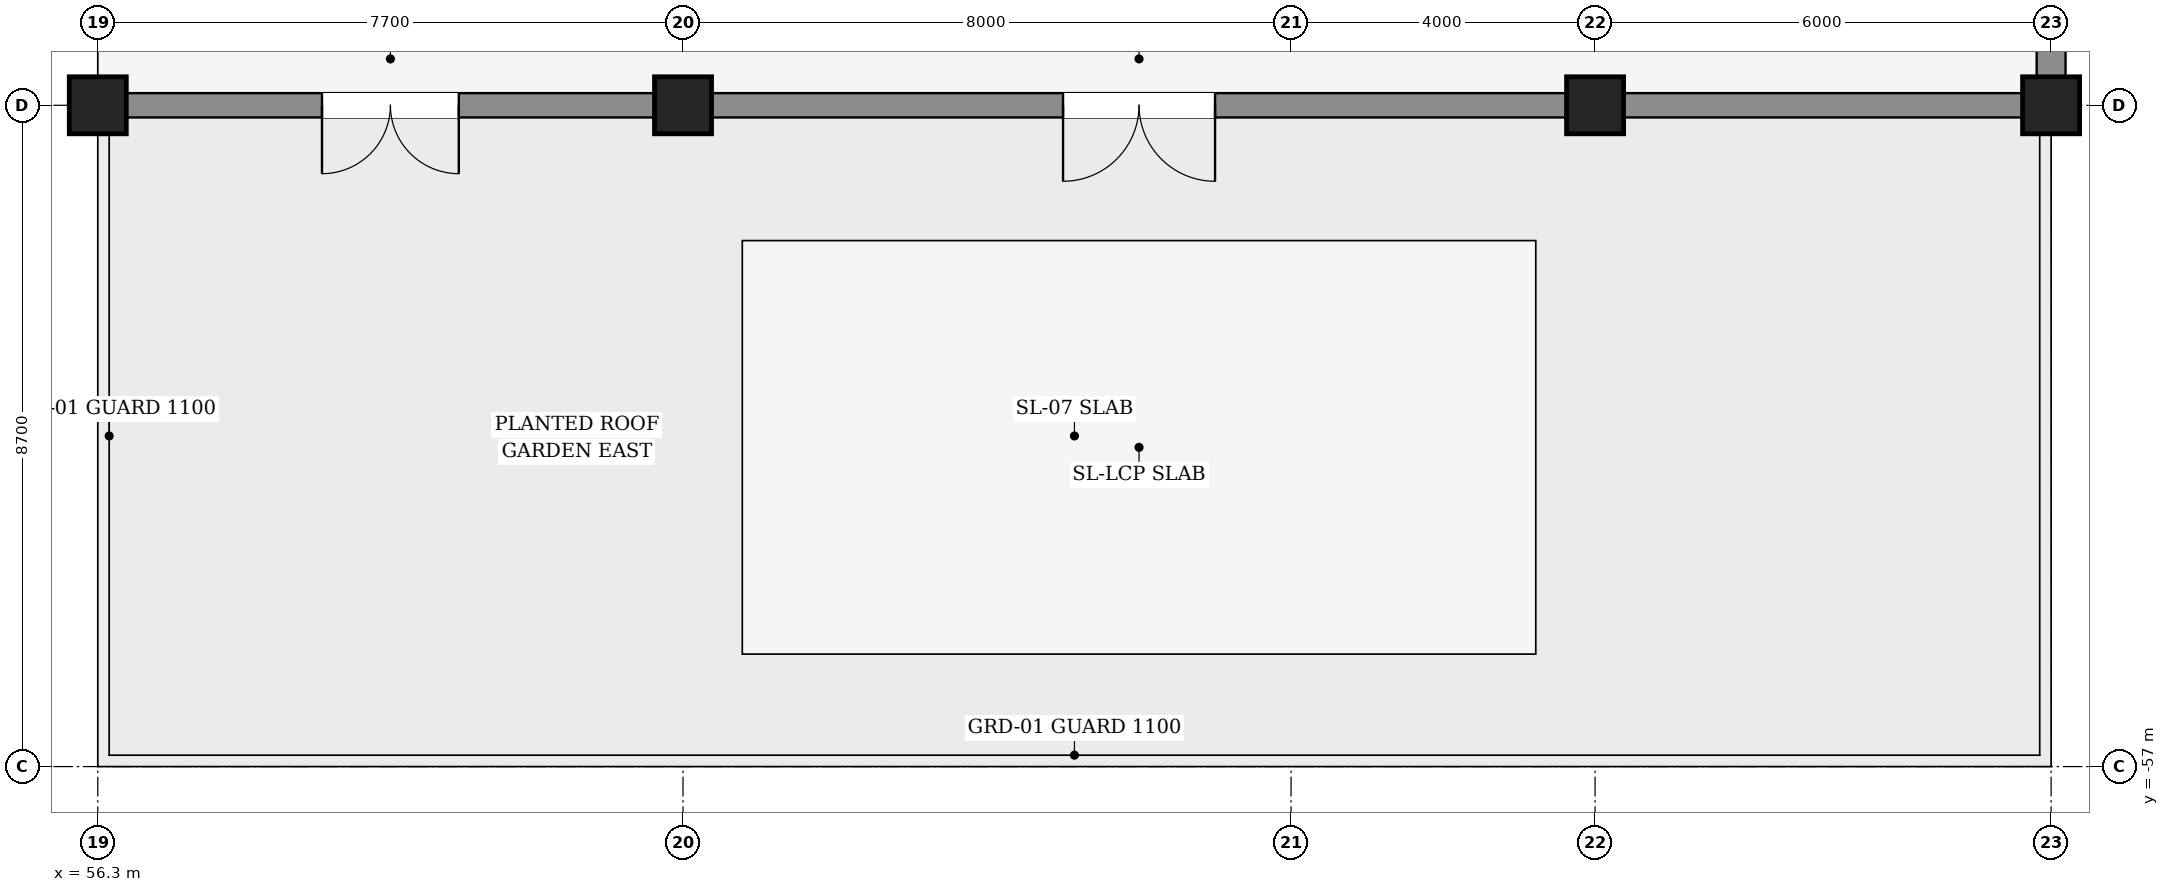
"""IFC4 building model, lengths in metres.
Left out: names, types, materials, properties, quantities, classifications, styles, units other than length and angle.
Written with IfcOpenShell. Run it as: python <this file> out.ifc"""

import sys

from ifc_helpers import new_model, si_unit, direction, frame, frame_2d, origin, origin_2d, place, context, subcontext, project, spatial, rectangle, extrude, element, fill, save


model = new_model("IFC4")
c1 = context("Model", 3, precision=1e-05, world=origin(), true_north=direction((0.0, 1.0)))
c2 = subcontext(c1, "Body", "Model", "MODEL_VIEW")
j1 = project(units=[si_unit("LENGTHUNIT", "METRE"), si_unit("PLANEANGLEUNIT", "RADIAN")], contexts=[c1])
p1 = place(None, origin())
s1 = spatial("IfcSite", under=j1, at=p1, CompositionType="ELEMENT")
p2 = place(p1, origin())
s2 = spatial("IfcBuilding", under=s1, at=p2, CompositionType="ELEMENT")
p3 = place(p2, frame((0.0, 0.0, 21.0)))
s3 = spatial("IfcBuildingStorey", under=s2, at=p3, CompositionType="ELEMENT", Elevation=21.0)
for number, where, z_axis, x_axis in (
    (1, (56.3, -48.3, 0.0), (0.0, 0.0, 1.0), (1.0, 0.0, 0.0)),
    (2, (64.0, -48.3, 0.0), (0.0, 0.0, 1.0), (1.0, 0.0, 0.0)),
    (3, (76.0, -48.3, 0.0), (0.0, 0.0, 1.0), (1.0, 0.0, 0.0)),
    (4, (82.0, -48.3, 0.0), (0.0, 0.0, 1.0), (1.0, 0.0, 0.0)),
):
    element("IfcColumn", number, at=place(p3, frame(where, z_axis=z_axis, x_axis=x_axis)), inside=s3, PredefinedType="COLUMN", context=c2, shape_type="SweptSolid", body=[
        extrude(rectangle(XDim=0.75, YDim=0.75, at=origin_2d()), origin(), (0.0, 0.0, 1.0), 5.4),
    ])
p4 = place(p3, frame((82.0, -34.357, 0.0), z_axis=(0.0, 0.0, 1.0), x_axis=(0.0, -1.0, 0.0)))
e5 = element("IfcWall", 5, at=p4, inside=s3, PredefinedType="SOLIDWALL", context=c2, shape_type="SweptSolid", body=[
    extrude(rectangle(XDim=13.586, YDim=0.38, at=frame_2d((6.793, 0.0))), origin(), (0.0, 0.0, 1.0), 4.36),
])
p5 = place(p4, frame((5.868, 0.0, 0.9)))
e6 = element("IfcOpeningElement", 6, at=p5, cuts=e5, PredefinedType="OPENING", context=c2, shape_type="SweptSolid", body=[
    extrude(rectangle(XDim=1.85, YDim=2.8, at=frame_2d((0.925, 1.4))), frame((0.0, 0.2, 0.0), z_axis=(0.0, -1.0, 0.0), x_axis=(1.0, 0.0, 0.0)), (0.0, 0.0, 1.0), 0.4),
])
p6 = place(p3, frame((63.643, -48.3, 0.0), z_axis=(0.0, 0.0, 1.0), x_axis=(-1.0, 0.0, 0.0)))
e7 = element("IfcWall", 7, at=p6, inside=s3, PredefinedType="SOLIDWALL", context=c2, shape_type="SweptSolid", body=[
    extrude(rectangle(XDim=6.986, YDim=0.32, at=frame_2d((3.493, 0.0))), origin(), (0.0, 0.0, 1.0), 4.36),
])
p7 = place(p6, frame((2.593, 0.0, 0.0)))
e8 = element("IfcOpeningElement", 8, at=p7, cuts=e7, PredefinedType="OPENING", context=c2, shape_type="SweptSolid", body=[
    extrude(rectangle(XDim=1.8, YDim=2.4, at=frame_2d((0.9, 1.2))), frame((0.0, 0.17, 0.0), z_axis=(0.0, -1.0, 0.0), x_axis=(1.0, 0.0, 0.0)), (0.0, 0.0, 1.0), 0.34),
])
p8 = place(p3, frame((75.643, -48.3, 0.0), z_axis=(0.0, 0.0, 1.0), x_axis=(-1.0, 0.0, 0.0)))
e9 = element("IfcWall", 9, at=p8, inside=s3, PredefinedType="SOLIDWALL", context=c2, shape_type="SweptSolid", body=[
    extrude(rectangle(XDim=11.286, YDim=0.32, at=frame_2d((5.643, 0.0))), origin(), (0.0, 0.0, 1.0), 4.16),
])
p9 = place(p8, frame((4.643, 0.0, 0.0)))
e10 = element("IfcOpeningElement", 10, at=p9, cuts=e9, PredefinedType="OPENING", context=c2, shape_type="SweptSolid", body=[
    extrude(rectangle(XDim=2.0, YDim=2.4, at=frame_2d((1.0, 1.2))), frame((0.0, 0.17, 0.0), z_axis=(0.0, -1.0, 0.0), x_axis=(1.0, 0.0, 0.0)), (0.0, 0.0, 1.0), 0.34),
])
p10 = place(p3, frame((81.643, -48.3, 0.0), z_axis=(0.0, 0.0, 1.0), x_axis=(-1.0, 0.0, 0.0)))
e11 = element("IfcWall", 11, at=p10, inside=s3, PredefinedType="SOLIDWALL", context=c2, shape_type="SweptSolid", body=[
    extrude(rectangle(XDim=5.286, YDim=0.32, at=frame_2d((2.643, 0.0))), origin(), (0.0, 0.0, 1.0), 4.36),
])
p11 = place(p7, origin())
e12 = element("IfcDoor", 12, at=p11, inside=s3, OperationType="DOUBLE_DOOR_SINGLE_SWING", PredefinedType="DOOR", context=c2, shape_type="SweptSolid", body=[
    extrude(rectangle(XDim=1.8, YDim=2.4, at=frame_2d((0.9, 1.2))), frame((0.0, 0.025, 0.0), z_axis=(0.0, -1.0, 0.0), x_axis=(1.0, 0.0, 0.0)), (0.0, 0.0, 1.0), 0.05),
])
fill(e8, e12)
p12 = place(p9, origin())
e13 = element("IfcDoor", 13, at=p12, inside=s3, OperationType="DOUBLE_DOOR_SINGLE_SWING", PredefinedType="DOOR", context=c2, shape_type="SweptSolid", body=[
    extrude(rectangle(XDim=2.0, YDim=2.4, at=frame_2d((1.0, 1.2))), frame((0.0, 0.025, 0.0), z_axis=(0.0, -1.0, 0.0), x_axis=(1.0, 0.0, 0.0)), (0.0, 0.0, 1.0), 0.05),
])
fill(e10, e13)
save(model, sys.argv[1])
